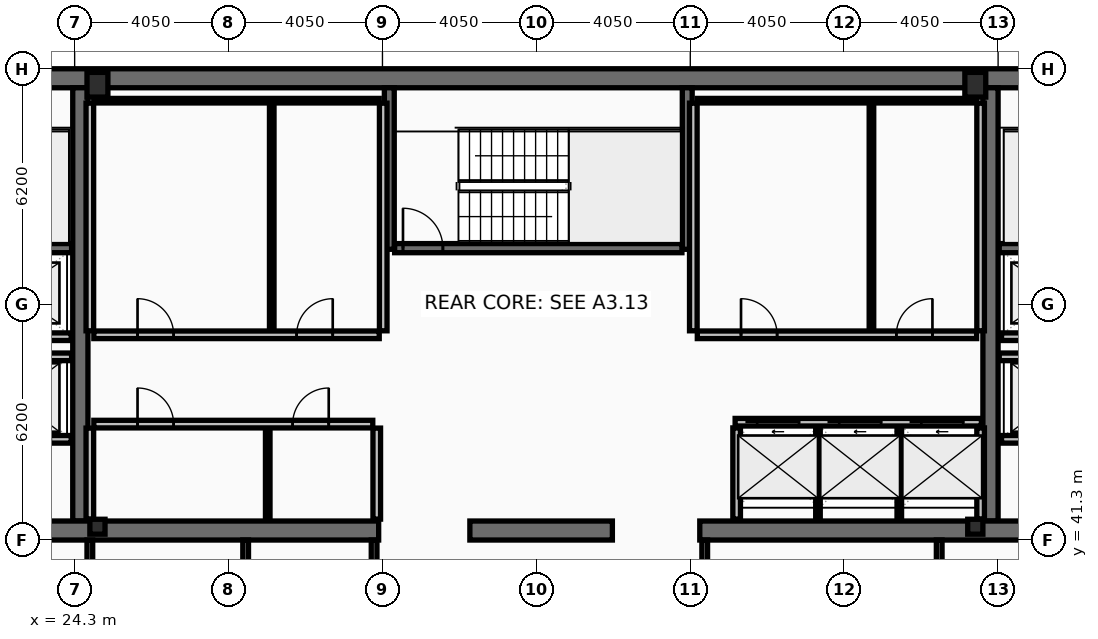
"""IFC4 building model, lengths in metres.
Left out: names, types, materials, properties, quantities, classifications, styles, units other than length and angle.
Written with IfcOpenShell. Run it as: python <this file> out.ifc"""

import sys

from ifc_helpers import new_model, si_unit, direction, frame, frame_2d, origin, origin_2d, place, context, subcontext, project, spatial, rectangle, hollow_rectangle, i_section, extrude, element, fill, save


model = new_model("IFC4")
c1 = context("Model", 3, precision=1e-05, world=origin(), true_north=direction((0.0, 1.0)))
c2 = subcontext(c1, "Body", "Model", "MODEL_VIEW")
j1 = project(units=[si_unit("LENGTHUNIT", "METRE"), si_unit("PLANEANGLEUNIT", "RADIAN")], contexts=[c1])
p1 = place(None, origin())
s1 = spatial("IfcSite", under=j1, at=p1, CompositionType="ELEMENT")
p2 = place(p1, origin())
s2 = spatial("IfcBuilding", under=s1, at=p2, CompositionType="ELEMENT")
p3 = place(p2, frame((0.0, 0.0, 291.4)))
s3 = spatial("IfcBuildingStorey", under=s2, at=p3, CompositionType="ELEMENT", Elevation=291.4)
p4 = place(p3, frame((16.2, 53.45, 0.0), z_axis=(0.0, 0.0, 1.0), x_axis=(1.0, 0.0, 0.0)))
e1 = element("IfcWall", 1, at=p4, inside=s3, PredefinedType="SHEAR", context=c2, shape_type="SweptSolid", body=[
    extrude(rectangle(XDim=40.5, YDim=0.5, at=frame_2d((20.25, 0.0))), origin(), (0.0, 0.0, 1.0), 3.44),
])
for number, where, z_axis, x_axis in (
    (2, (24.45, 41.8, 0.0), (0.0, 0.0, 1.0), (0.0, 1.0, 0.0)),
    (3, (48.4, 41.8, 0.0), (0.0, 0.0, 1.0), (0.0, 1.0, 0.0)),
):
    element("IfcWall", number, at=place(p3, frame(where, z_axis=z_axis, x_axis=x_axis)), inside=s3, PredefinedType="SHEAR", context=c2, shape_type="SweptSolid", body=[
        extrude(rectangle(XDim=11.4, YDim=0.4, at=frame_2d((5.7, 0.0))), origin(), (0.0, 0.0, 1.0), 3.44),
    ])
p5 = place(p3, frame((32.3, 41.55, 0.0), z_axis=(0.0, 0.0, 1.0), x_axis=(-1.0, 0.0, 0.0)))
e4 = element("IfcWall", 4, at=p5, inside=s3, PredefinedType="SHEAR", context=c2, shape_type="SweptSolid", body=[
    extrude(rectangle(XDim=11.45, YDim=0.5, at=frame_2d((5.725, 0.0))), origin(), (0.0, 0.0, 1.0), 3.44),
])
p6 = place(p3, frame((38.45, 41.55, 0.0), z_axis=(0.0, 0.0, 1.0), x_axis=(-1.0, 0.0, 0.0)))
e5 = element("IfcWall", 5, at=p6, inside=s3, PredefinedType="SHEAR", context=c2, shape_type="SweptSolid", body=[
    extrude(rectangle(XDim=3.75, YDim=0.5, at=frame_2d((1.875, 0.0))), origin(), (0.0, 0.0, 1.0), 3.44),
])
p7 = place(p3, frame((52.05, 41.55, 0.0), z_axis=(0.0, 0.0, 1.0), x_axis=(-1.0, 0.0, 0.0)))
e6 = element("IfcWall", 6, at=p7, inside=s3, PredefinedType="SHEAR", context=c2, shape_type="SweptSolid", body=[
    extrude(rectangle(XDim=11.3, YDim=0.5, at=frame_2d((5.65, 0.0))), origin(), (0.0, 0.0, 1.0), 3.44),
])
for number, where, z_axis, x_axis in (
    (7, (32.58, 48.95, 0.0), (0.0, 0.0, 1.0), (0.0, 1.0, 0.0)),
    (8, (40.42, 48.95, 0.0), (0.0, 0.0, 1.0), (0.0, 1.0, 0.0)),
):
    element("IfcWall", number, at=place(p3, frame(where, z_axis=z_axis, x_axis=x_axis)), inside=s3, PredefinedType="SHEAR", context=c2, shape_type="SweptSolid", body=[
        extrude(rectangle(XDim=4.25, YDim=0.26, at=frame_2d((2.125, 0.0))), origin(), (0.0, 0.0, 1.0), 3.44),
    ])
p8 = place(p3, frame((16.7, 48.98, 0.0), z_axis=(0.0, 0.0, 1.0), x_axis=(1.0, 0.0, 0.0)))
e9 = element("IfcWall", 9, at=p8, inside=s3, PredefinedType="SHEAR", context=c2, shape_type="SweptSolid", body=[
    extrude(rectangle(XDim=7.52, YDim=0.24, at=frame_2d((3.76, 0.0))), origin(), (0.0, 0.0, 1.0), 3.44),
])
p9 = place(p8, frame((0.22, 0.0, 0.0)))
e10 = element("IfcOpeningElement", 10, at=p9, cuts=e9, PredefinedType="OPENING", context=c2, shape_type="SweptSolid", body=[
    extrude(rectangle(XDim=1.05, YDim=2.15, at=frame_2d((0.525, 1.075))), frame((0.0, 0.13, 0.0), z_axis=(0.0, -1.0, 0.0), x_axis=(1.0, 0.0, 0.0)), (0.0, 0.0, 1.0), 0.26),
])
p10 = place(p3, frame((48.63, 48.98, 0.0), z_axis=(0.0, 0.0, 1.0), x_axis=(1.0, 0.0, 0.0)))
e11 = element("IfcWall", 11, at=p10, inside=s3, PredefinedType="SHEAR", context=c2, shape_type="SweptSolid", body=[
    extrude(rectangle(XDim=7.57, YDim=0.24, at=frame_2d((3.785, 0.0))), origin(), (0.0, 0.0, 1.0), 3.44),
])
p11 = place(p10, frame((6.3, 0.0, 0.0)))
e12 = element("IfcOpeningElement", 12, at=p11, cuts=e11, PredefinedType="OPENING", context=c2, shape_type="SweptSolid", body=[
    extrude(rectangle(XDim=1.05, YDim=2.15, at=frame_2d((0.525, 1.075))), frame((0.0, 0.13, 0.0), z_axis=(0.0, -1.0, 0.0), x_axis=(1.0, 0.0, 0.0)), (0.0, 0.0, 1.0), 0.26),
])
p12 = place(p3, frame((32.72, 48.98, 0.0), z_axis=(0.0, 0.0, 1.0), x_axis=(1.0, 0.0, 0.0)))
e13 = element("IfcWall", 13, at=p12, inside=s3, PredefinedType="SHEAR", context=c2, shape_type="SweptSolid", body=[
    extrude(rectangle(XDim=7.56, YDim=0.24, at=frame_2d((3.78, 0.0))), origin(), (0.0, 0.0, 1.0), 3.44),
])
p13 = place(p12, frame((0.22, 0.0, 0.0)))
e14 = element("IfcOpeningElement", 14, at=p13, cuts=e13, PredefinedType="OPENING", context=c2, shape_type="SweptSolid", body=[
    extrude(rectangle(XDim=1.05, YDim=2.15, at=frame_2d((0.525, 1.075))), frame((0.0, 0.13, 0.0), z_axis=(0.0, -1.0, 0.0), x_axis=(1.0, 0.0, 0.0)), (0.0, 0.0, 1.0), 0.26),
])
for number, where, z_axis, x_axis in (
    (15, (24.9, 53.28, 0.0), (0.0, 0.0, 1.0), (1.0, 0.0, 0.0)),
    (16, (48.0, 53.28, 0.0), (0.0, 0.0, 1.0), (1.0, 0.0, 0.0)),
):
    element("IfcColumn", number, at=place(p3, frame(where, z_axis=z_axis, x_axis=x_axis)), inside=s3, PredefinedType="COLUMN", context=c2, shape_type="SweptSolid", body=[
        extrude(hollow_rectangle(XDim=0.55, YDim=0.65, WallThickness=0.04, at=origin_2d()), origin(), (0.0, 0.0, 1.0), 3.6),
    ])
for number, where, z_axis, x_axis in (
    (17, (24.9, 41.65, 0.0), (0.0, 0.0, 1.0), (1.0, 0.0, 0.0)),
    (18, (48.0, 41.65, 0.0), (0.0, 0.0, 1.0), (1.0, 0.0, 0.0)),
):
    element("IfcColumn", number, at=place(p3, frame(where, z_axis=z_axis, x_axis=x_axis)), inside=s3, PredefinedType="COLUMN", context=c2, shape_type="SweptSolid", body=[
        extrude(i_section(OverallWidth=0.399, OverallDepth=0.393, WebThickness=0.023, FlangeThickness=0.037, at=origin_2d()), origin(), (0.0, 0.0, 1.0), 3.6),
    ])
p14 = place(p3, frame((41.68, 44.4, 0.0), z_axis=(0.0, 0.0, 1.0), x_axis=(1.0, 0.0, 0.0)))
e19 = element("IfcWall", 19, at=p14, inside=s3, PredefinedType="PARTITIONING", context=c2, shape_type="SweptSolid", body=[
    extrude(rectangle(XDim=6.48, YDim=0.2, at=frame_2d((3.24, 0.0))), origin(), (0.0, 0.0, 1.0), 3.44),
])
p15 = place(p14, frame((0.58, 0.0, 0.0)))
e20 = element("IfcOpeningElement", 20, at=p15, cuts=e19, PredefinedType="OPENING", context=c2, shape_type="SweptSolid", body=[
    extrude(rectangle(XDim=1.1, YDim=2.18, at=frame_2d((0.55, 1.09))), frame((0.0, 0.11, 0.0), z_axis=(0.0, -1.0, 0.0), x_axis=(1.0, 0.0, 0.0)), (0.0, 0.0, 1.0), 0.22),
])
p16 = place(p14, frame((2.74, 0.0, 0.0)))
e21 = element("IfcOpeningElement", 21, at=p16, cuts=e19, PredefinedType="OPENING", context=c2, shape_type="SweptSolid", body=[
    extrude(rectangle(XDim=1.1, YDim=2.18, at=frame_2d((0.55, 1.09))), frame((0.0, 0.11, 0.0), z_axis=(0.0, -1.0, 0.0), x_axis=(1.0, 0.0, 0.0)), (0.0, 0.0, 1.0), 0.22),
])
p17 = place(p14, frame((4.9, 0.0, 0.0)))
e22 = element("IfcOpeningElement", 22, at=p17, cuts=e19, PredefinedType="OPENING", context=c2, shape_type="SweptSolid", body=[
    extrude(rectangle(XDim=1.1, YDim=2.18, at=frame_2d((0.55, 1.09))), frame((0.0, 0.11, 0.0), z_axis=(0.0, -1.0, 0.0), x_axis=(1.0, 0.0, 0.0)), (0.0, 0.0, 1.0), 0.22),
])
p18 = place(p3, frame((51.61, 43.95, 0.0), z_axis=(0.0, 0.0, 1.0), x_axis=(-1.0, 0.0, 0.0)))
e23 = element("IfcWall", 23, at=p18, inside=s3, PredefinedType="PARTITIONING", context=c2, shape_type="SweptSolid", body=[
    extrude(rectangle(XDim=2.92, YDim=0.2, at=frame_2d((1.46, 0.0))), origin(), (0.0, 0.0, 1.0), 3.44),
])
p19 = place(p18, frame((0.81, 0.0, 0.0)))
e24 = element("IfcOpeningElement", 24, at=p19, cuts=e23, PredefinedType="OPENING", context=c2, shape_type="SweptSolid", body=[
    extrude(rectangle(XDim=1.3, YDim=2.18, at=frame_2d((0.65, 1.09))), frame((0.0, 0.11, 0.0), z_axis=(0.0, -1.0, 0.0), x_axis=(1.0, 0.0, 0.0)), (0.0, 0.0, 1.0), 0.22),
])
p20 = place(p3, frame((24.21, 43.95, 0.0), z_axis=(0.0, 0.0, 1.0), x_axis=(-1.0, 0.0, 0.0)))
e25 = element("IfcWall", 25, at=p20, inside=s3, PredefinedType="PARTITIONING", context=c2, shape_type="SweptSolid", body=[
    extrude(rectangle(XDim=2.97, YDim=0.2, at=frame_2d((1.485, 0.0))), origin(), (0.0, 0.0, 1.0), 3.44),
])
p21 = place(p20, frame((0.86, 0.0, 0.0)))
e26 = element("IfcOpeningElement", 26, at=p21, cuts=e25, PredefinedType="OPENING", context=c2, shape_type="SweptSolid", body=[
    extrude(rectangle(XDim=1.3, YDim=2.18, at=frame_2d((0.65, 1.09))), frame((0.0, 0.11, 0.0), z_axis=(0.0, -1.0, 0.0), x_axis=(1.0, 0.0, 0.0)), (0.0, 0.0, 1.0), 0.22),
])
p22 = place(p3, frame((51.61, 46.65, 0.0), z_axis=(0.0, 0.0, 1.0), x_axis=(-1.0, 0.0, 0.0)))
e27 = element("IfcWall", 27, at=p22, inside=s3, PredefinedType="PARTITIONING", context=c2, shape_type="SweptSolid", body=[
    extrude(rectangle(XDim=2.92, YDim=0.2, at=frame_2d((1.46, 0.0))), origin(), (0.0, 0.0, 1.0), 3.44),
])
p23 = place(p22, frame((0.86, 0.0, 0.0)))
e28 = element("IfcOpeningElement", 28, at=p23, cuts=e27, PredefinedType="OPENING", context=c2, shape_type="SweptSolid", body=[
    extrude(rectangle(XDim=1.2, YDim=2.18, at=frame_2d((0.6, 1.09))), frame((0.0, 0.11, 0.0), z_axis=(0.0, -1.0, 0.0), x_axis=(1.0, 0.0, 0.0)), (0.0, 0.0, 1.0), 0.22),
])
p24 = place(p3, frame((24.21, 46.65, 0.0), z_axis=(0.0, 0.0, 1.0), x_axis=(-1.0, 0.0, 0.0)))
e29 = element("IfcWall", 29, at=p24, inside=s3, PredefinedType="PARTITIONING", context=c2, shape_type="SweptSolid", body=[
    extrude(rectangle(XDim=2.97, YDim=0.2, at=frame_2d((1.485, 0.0))), origin(), (0.0, 0.0, 1.0), 3.44),
])
p25 = place(p24, frame((0.91, 0.0, 0.0)))
e30 = element("IfcOpeningElement", 30, at=p25, cuts=e29, PredefinedType="OPENING", context=c2, shape_type="SweptSolid", body=[
    extrude(rectangle(XDim=1.2, YDim=2.18, at=frame_2d((0.6, 1.09))), frame((0.0, 0.11, 0.0), z_axis=(0.0, -1.0, 0.0), x_axis=(1.0, 0.0, 0.0)), (0.0, 0.0, 1.0), 0.22),
])
p26 = place(p3, frame((21.2, 46.12, 0.0), z_axis=(0.0, 0.0, 1.0), x_axis=(1.0, 0.0, 0.0)))
e31 = element("IfcWall", 31, at=p26, inside=s3, PredefinedType="PARTITIONING", context=c2, shape_type="SweptSolid", body=[
    extrude(rectangle(XDim=3.02, YDim=0.2, at=frame_2d((1.51, 0.0))), origin(), (0.0, 0.0, 1.0), 3.44),
])
p27 = place(p3, frame((48.63, 46.12, 0.0), z_axis=(0.0, 0.0, 1.0), x_axis=(1.0, 0.0, 0.0)))
e32 = element("IfcWall", 32, at=p27, inside=s3, PredefinedType="PARTITIONING", context=c2, shape_type="SweptSolid", body=[
    extrude(rectangle(XDim=3.07, YDim=0.2, at=frame_2d((1.535, 0.0))), origin(), (0.0, 0.0, 1.0), 3.44),
])
for number, where, z_axis, x_axis in (
    (33, (24.7, 46.805, 0.0), (0.0, 0.0, 1.0), (0.0, 1.0, 0.0)),
    (34, (32.42, 46.805, 0.0), (0.0, 0.0, 1.0), (0.0, 1.0, 0.0)),
):
    element("IfcWall", number, at=place(p3, frame(where, z_axis=z_axis, x_axis=x_axis)), inside=s3, PredefinedType="PARTITIONING", context=c2, shape_type="SweptSolid", body=[
        extrude(rectangle(XDim=5.99, YDim=0.2, at=frame_2d((2.995, 0.0))), origin(), (0.0, 0.0, 1.0), 3.44),
    ])
p28 = place(p3, frame((24.805, 52.86, 0.0), z_axis=(0.0, 0.0, 1.0), x_axis=(1.0, 0.0, 0.0)))
e35 = element("IfcWall", 35, at=p28, inside=s3, PredefinedType="PARTITIONING", context=c2, shape_type="SweptSolid", body=[
    extrude(rectangle(XDim=7.51, YDim=0.12, at=frame_2d((3.755, 0.0))), origin(), (0.0, 0.0, 1.0), 3.44),
])
p29 = place(p3, frame((29.486, 46.805, 0.0), z_axis=(0.0, 0.0, 1.0), x_axis=(0.0, 1.0, 0.0)))
e36 = element("IfcWall", 36, at=p29, inside=s3, PredefinedType="PARTITIONING", context=c2, shape_type="SweptSolid", body=[
    extrude(rectangle(XDim=5.99, YDim=0.12, at=frame_2d((2.995, 0.0))), origin(), (0.0, 0.0, 1.0), 3.44),
])
p30 = place(p3, frame((24.805, 46.7, 0.0), z_axis=(0.0, 0.0, 1.0), x_axis=(1.0, 0.0, 0.0)))
e37 = element("IfcWall", 37, at=p30, inside=s3, PredefinedType="PARTITIONING", context=c2, shape_type="SweptSolid", body=[
    extrude(rectangle(XDim=7.51, YDim=0.2, at=frame_2d((3.755, 0.0))), origin(), (0.0, 0.0, 1.0), 3.44),
])
p31 = place(p30, frame((1.15, 0.0, 0.0)))
e38 = element("IfcOpeningElement", 38, at=p31, cuts=e37, PredefinedType="OPENING", context=c2, shape_type="SweptSolid", body=[
    extrude(rectangle(XDim=0.95, YDim=2.1, at=frame_2d((0.475, 1.05))), frame((0.0, 0.11, 0.0), z_axis=(0.0, -1.0, 0.0), x_axis=(1.0, 0.0, 0.0)), (0.0, 0.0, 1.0), 0.22),
])
p32 = place(p30, frame((5.336, 0.0, 0.0)))
e39 = element("IfcOpeningElement", 39, at=p32, cuts=e37, PredefinedType="OPENING", context=c2, shape_type="SweptSolid", body=[
    extrude(rectangle(XDim=0.95, YDim=2.1, at=frame_2d((0.475, 1.05))), frame((0.0, 0.11, 0.0), z_axis=(0.0, -1.0, 0.0), x_axis=(1.0, 0.0, 0.0)), (0.0, 0.0, 1.0), 0.22),
])
for number, where, z_axis, x_axis in (
    (40, (24.7, 41.85, 0.0), (0.0, 0.0, 1.0), (0.0, 1.0, 0.0)),
    (41, (32.25, 41.85, 0.0), (0.0, 0.0, 1.0), (0.0, 1.0, 0.0)),
):
    element("IfcWall", number, at=place(p3, frame(where, z_axis=z_axis, x_axis=x_axis)), inside=s3, PredefinedType="PARTITIONING", context=c2, shape_type="SweptSolid", body=[
        extrude(rectangle(XDim=2.395, YDim=0.2, at=frame_2d((1.198, 0.0))), origin(), (0.0, 0.0, 1.0), 3.44),
    ])
p33 = place(p3, frame((29.381, 41.85, 0.0), z_axis=(0.0, 0.0, 1.0), x_axis=(0.0, 1.0, 0.0)))
e42 = element("IfcWall", 42, at=p33, inside=s3, PredefinedType="PARTITIONING", context=c2, shape_type="SweptSolid", body=[
    extrude(rectangle(XDim=2.395, YDim=0.12, at=frame_2d((1.198, 0.0))), origin(), (0.0, 0.0, 1.0), 3.44),
])
p34 = place(p3, frame((24.805, 44.35, 0.0), z_axis=(0.0, 0.0, 1.0), x_axis=(1.0, 0.0, 0.0)))
e43 = element("IfcWall", 43, at=p34, inside=s3, PredefinedType="PARTITIONING", context=c2, shape_type="SweptSolid", body=[
    extrude(rectangle(XDim=7.34, YDim=0.2, at=frame_2d((3.67, 0.0))), origin(), (0.0, 0.0, 1.0), 3.44),
])
p35 = place(p34, frame((1.15, 0.0, 0.0)))
e44 = element("IfcOpeningElement", 44, at=p35, cuts=e43, PredefinedType="OPENING", context=c2, shape_type="SweptSolid", body=[
    extrude(rectangle(XDim=0.95, YDim=2.1, at=frame_2d((0.475, 1.05))), frame((0.0, 0.11, 0.0), z_axis=(0.0, -1.0, 0.0), x_axis=(1.0, 0.0, 0.0)), (0.0, 0.0, 1.0), 0.22),
])
p36 = place(p34, frame((5.231, 0.0, 0.0)))
e45 = element("IfcOpeningElement", 45, at=p36, cuts=e43, PredefinedType="OPENING", context=c2, shape_type="SweptSolid", body=[
    extrude(rectangle(XDim=0.95, YDim=2.1, at=frame_2d((0.475, 1.05))), frame((0.0, 0.11, 0.0), z_axis=(0.0, -1.0, 0.0), x_axis=(1.0, 0.0, 0.0)), (0.0, 0.0, 1.0), 0.22),
])
for number, where, z_axis, x_axis in (
    (46, (40.58, 46.805, 0.0), (0.0, 0.0, 1.0), (0.0, 1.0, 0.0)),
    (47, (48.14, 46.805, 0.0), (0.0, 0.0, 1.0), (0.0, 1.0, 0.0)),
):
    element("IfcWall", number, at=place(p3, frame(where, z_axis=z_axis, x_axis=x_axis)), inside=s3, PredefinedType="PARTITIONING", context=c2, shape_type="SweptSolid", body=[
        extrude(rectangle(XDim=5.99, YDim=0.2, at=frame_2d((2.995, 0.0))), origin(), (0.0, 0.0, 1.0), 3.44),
    ])
p37 = place(p3, frame((40.685, 52.86, 0.0), z_axis=(0.0, 0.0, 1.0), x_axis=(1.0, 0.0, 0.0)))
e48 = element("IfcWall", 48, at=p37, inside=s3, PredefinedType="PARTITIONING", context=c2, shape_type="SweptSolid", body=[
    extrude(rectangle(XDim=7.35, YDim=0.12, at=frame_2d((3.675, 0.0))), origin(), (0.0, 0.0, 1.0), 3.44),
])
p38 = place(p3, frame((45.267, 46.805, 0.0), z_axis=(0.0, 0.0, 1.0), x_axis=(0.0, 1.0, 0.0)))
e49 = element("IfcWall", 49, at=p38, inside=s3, PredefinedType="PARTITIONING", context=c2, shape_type="SweptSolid", body=[
    extrude(rectangle(XDim=5.99, YDim=0.12, at=frame_2d((2.995, 0.0))), origin(), (0.0, 0.0, 1.0), 3.44),
])
p39 = place(p3, frame((40.685, 46.7, 0.0), z_axis=(0.0, 0.0, 1.0), x_axis=(1.0, 0.0, 0.0)))
e50 = element("IfcWall", 50, at=p39, inside=s3, PredefinedType="PARTITIONING", context=c2, shape_type="SweptSolid", body=[
    extrude(rectangle(XDim=7.35, YDim=0.2, at=frame_2d((3.675, 0.0))), origin(), (0.0, 0.0, 1.0), 3.44),
])
p40 = place(p39, frame((1.15, 0.0, 0.0)))
e51 = element("IfcOpeningElement", 51, at=p40, cuts=e50, PredefinedType="OPENING", context=c2, shape_type="SweptSolid", body=[
    extrude(rectangle(XDim=0.95, YDim=2.1, at=frame_2d((0.475, 1.05))), frame((0.0, 0.11, 0.0), z_axis=(0.0, -1.0, 0.0), x_axis=(1.0, 0.0, 0.0)), (0.0, 0.0, 1.0), 0.22),
])
p41 = place(p39, frame((5.237, 0.0, 0.0)))
e52 = element("IfcOpeningElement", 52, at=p41, cuts=e50, PredefinedType="OPENING", context=c2, shape_type="SweptSolid", body=[
    extrude(rectangle(XDim=0.95, YDim=2.1, at=frame_2d((0.475, 1.05))), frame((0.0, 0.11, 0.0), z_axis=(0.0, -1.0, 0.0), x_axis=(1.0, 0.0, 0.0)), (0.0, 0.0, 1.0), 0.22),
])
for number, where, z_axis, x_axis in (
    (53, (41.72, 41.85, 0.0), (0.0, 0.0, 1.0), (0.0, 1.0, 0.0)),
    (54, (48.14, 41.85, 0.0), (0.0, 0.0, 1.0), (0.0, 1.0, 0.0)),
):
    element("IfcWall", number, at=place(p3, frame(where, z_axis=z_axis, x_axis=x_axis)), inside=s3, PredefinedType="PARTITIONING", context=c2, shape_type="SweptSolid", body=[
        extrude(rectangle(XDim=2.4, YDim=0.2, at=frame_2d((1.2, 0.0))), origin(), (0.0, 0.0, 1.0), 3.44),
    ])
for number, where, z_axis, x_axis in (
    (55, (43.86, 41.85, 0.0), (0.0, 0.0, 1.0), (0.0, 1.0, 0.0)),
    (56, (46.0, 41.85, 0.0), (0.0, 0.0, 1.0), (0.0, 1.0, 0.0)),
):
    element("IfcWall", number, at=place(p3, frame(where, z_axis=z_axis, x_axis=x_axis)), inside=s3, PredefinedType="PARTITIONING", context=c2, shape_type="SweptSolid", body=[
        extrude(rectangle(XDim=2.4, YDim=0.12, at=frame_2d((1.2, 0.0))), origin(), (0.0, 0.0, 1.0), 3.44),
    ])
p42 = place(p3, frame((24.7, 38.28, 0.0), z_axis=(0.0, 0.0, 1.0), x_axis=(0.0, 1.0, 0.0)))
e57 = element("IfcWall", 57, at=p42, inside=s3, PredefinedType="PARTITIONING", context=c2, shape_type="SweptSolid", body=[
    extrude(rectangle(XDim=3.02, YDim=0.15, at=frame_2d((1.51, 0.0))), origin(), (0.0, 0.0, 1.0), 2.78),
])
for number, where, z_axis, x_axis in (
    (58, (28.8, 38.28, 0.0), (0.0, 0.0, 1.0), (0.0, 1.0, 0.0)),
    (59, (32.18, 38.28, 0.0), (0.0, 0.0, 1.0), (0.0, 1.0, 0.0)),
    (60, (40.88, 38.28, 0.0), (0.0, 0.0, 1.0), (0.0, 1.0, 0.0)),
    (61, (47.05, 38.28, 0.0), (0.0, 0.0, 1.0), (0.0, 1.0, 0.0)),
):
    element("IfcWall", number, at=place(p3, frame(where, z_axis=z_axis, x_axis=x_axis)), inside=s3, PredefinedType="PARTITIONING", context=c2, shape_type="SweptSolid", body=[
        extrude(rectangle(XDim=3.02, YDim=0.15, at=frame_2d((1.51, 0.0))), origin(), (0.0, 0.0, 1.0), 3.44),
    ])
p43 = place(p13, origin())
e62 = element("IfcDoor", 62, at=p43, inside=s3, OperationType="SINGLE_SWING_LEFT", PredefinedType="DOOR", context=c2, shape_type="SweptSolid", body=[
    extrude(rectangle(XDim=1.05, YDim=2.15, at=frame_2d((0.525, 1.075))), frame((0.0, 0.025, 0.0), z_axis=(0.0, -1.0, 0.0), x_axis=(1.0, 0.0, 0.0)), (0.0, 0.0, 1.0), 0.05),
])
fill(e14, e62)
p44 = place(p15, origin())
e63 = element("IfcDoor", 63, at=p44, inside=s3, OperationType="SLIDING_TO_LEFT", PredefinedType="DOOR", context=c2, shape_type="SweptSolid", body=[
    extrude(rectangle(XDim=1.1, YDim=2.18, at=frame_2d((0.55, 1.09))), frame((0.0, 0.025, 0.0), z_axis=(0.0, -1.0, 0.0), x_axis=(1.0, 0.0, 0.0)), (0.0, 0.0, 1.0), 0.05),
])
fill(e20, e63)
p45 = place(p16, origin())
e64 = element("IfcDoor", 64, at=p45, inside=s3, OperationType="SLIDING_TO_LEFT", PredefinedType="DOOR", context=c2, shape_type="SweptSolid", body=[
    extrude(rectangle(XDim=1.1, YDim=2.18, at=frame_2d((0.55, 1.09))), frame((0.0, 0.025, 0.0), z_axis=(0.0, -1.0, 0.0), x_axis=(1.0, 0.0, 0.0)), (0.0, 0.0, 1.0), 0.05),
])
fill(e21, e64)
p46 = place(p17, origin())
e65 = element("IfcDoor", 65, at=p46, inside=s3, OperationType="SLIDING_TO_LEFT", PredefinedType="DOOR", context=c2, shape_type="SweptSolid", body=[
    extrude(rectangle(XDim=1.1, YDim=2.18, at=frame_2d((0.55, 1.09))), frame((0.0, 0.025, 0.0), z_axis=(0.0, -1.0, 0.0), x_axis=(1.0, 0.0, 0.0)), (0.0, 0.0, 1.0), 0.05),
])
fill(e22, e65)
p47 = place(p31, origin())
e66 = element("IfcDoor", 66, at=p47, inside=s3, OperationType="SINGLE_SWING_LEFT", PredefinedType="DOOR", context=c2, shape_type="SweptSolid", body=[
    extrude(rectangle(XDim=0.95, YDim=2.1, at=frame_2d((0.475, 1.05))), frame((0.0, 0.025, 0.0), z_axis=(0.0, -1.0, 0.0), x_axis=(1.0, 0.0, 0.0)), (0.0, 0.0, 1.0), 0.05),
])
fill(e38, e66)
p48 = place(p32, origin())
e67 = element("IfcDoor", 67, at=p48, inside=s3, OperationType="SINGLE_SWING_RIGHT", PredefinedType="DOOR", context=c2, shape_type="SweptSolid", body=[
    extrude(rectangle(XDim=0.95, YDim=2.1, at=frame_2d((0.475, 1.05))), frame((0.0, 0.025, 0.0), z_axis=(0.0, -1.0, 0.0), x_axis=(1.0, 0.0, 0.0)), (0.0, 0.0, 1.0), 0.05),
])
fill(e39, e67)
p49 = place(p35, origin())
e68 = element("IfcDoor", 68, at=p49, inside=s3, OperationType="SINGLE_SWING_LEFT", PredefinedType="DOOR", context=c2, shape_type="SweptSolid", body=[
    extrude(rectangle(XDim=0.95, YDim=2.1, at=frame_2d((0.475, 1.05))), frame((0.0, 0.025, 0.0), z_axis=(0.0, -1.0, 0.0), x_axis=(1.0, 0.0, 0.0)), (0.0, 0.0, 1.0), 0.05),
])
fill(e44, e68)
p50 = place(p36, origin())
e69 = element("IfcDoor", 69, at=p50, inside=s3, OperationType="SINGLE_SWING_RIGHT", PredefinedType="DOOR", context=c2, shape_type="SweptSolid", body=[
    extrude(rectangle(XDim=0.95, YDim=2.1, at=frame_2d((0.475, 1.05))), frame((0.0, 0.025, 0.0), z_axis=(0.0, -1.0, 0.0), x_axis=(1.0, 0.0, 0.0)), (0.0, 0.0, 1.0), 0.05),
])
fill(e45, e69)
p51 = place(p40, origin())
e70 = element("IfcDoor", 70, at=p51, inside=s3, OperationType="SINGLE_SWING_LEFT", PredefinedType="DOOR", context=c2, shape_type="SweptSolid", body=[
    extrude(rectangle(XDim=0.95, YDim=2.1, at=frame_2d((0.475, 1.05))), frame((0.0, 0.025, 0.0), z_axis=(0.0, -1.0, 0.0), x_axis=(1.0, 0.0, 0.0)), (0.0, 0.0, 1.0), 0.05),
])
fill(e51, e70)
p52 = place(p41, origin())
e71 = element("IfcDoor", 71, at=p52, inside=s3, OperationType="SINGLE_SWING_RIGHT", PredefinedType="DOOR", context=c2, shape_type="SweptSolid", body=[
    extrude(rectangle(XDim=0.95, YDim=2.1, at=frame_2d((0.475, 1.05))), frame((0.0, 0.025, 0.0), z_axis=(0.0, -1.0, 0.0), x_axis=(1.0, 0.0, 0.0)), (0.0, 0.0, 1.0), 0.05),
])
fill(e52, e71)
save(model, sys.argv[1])
